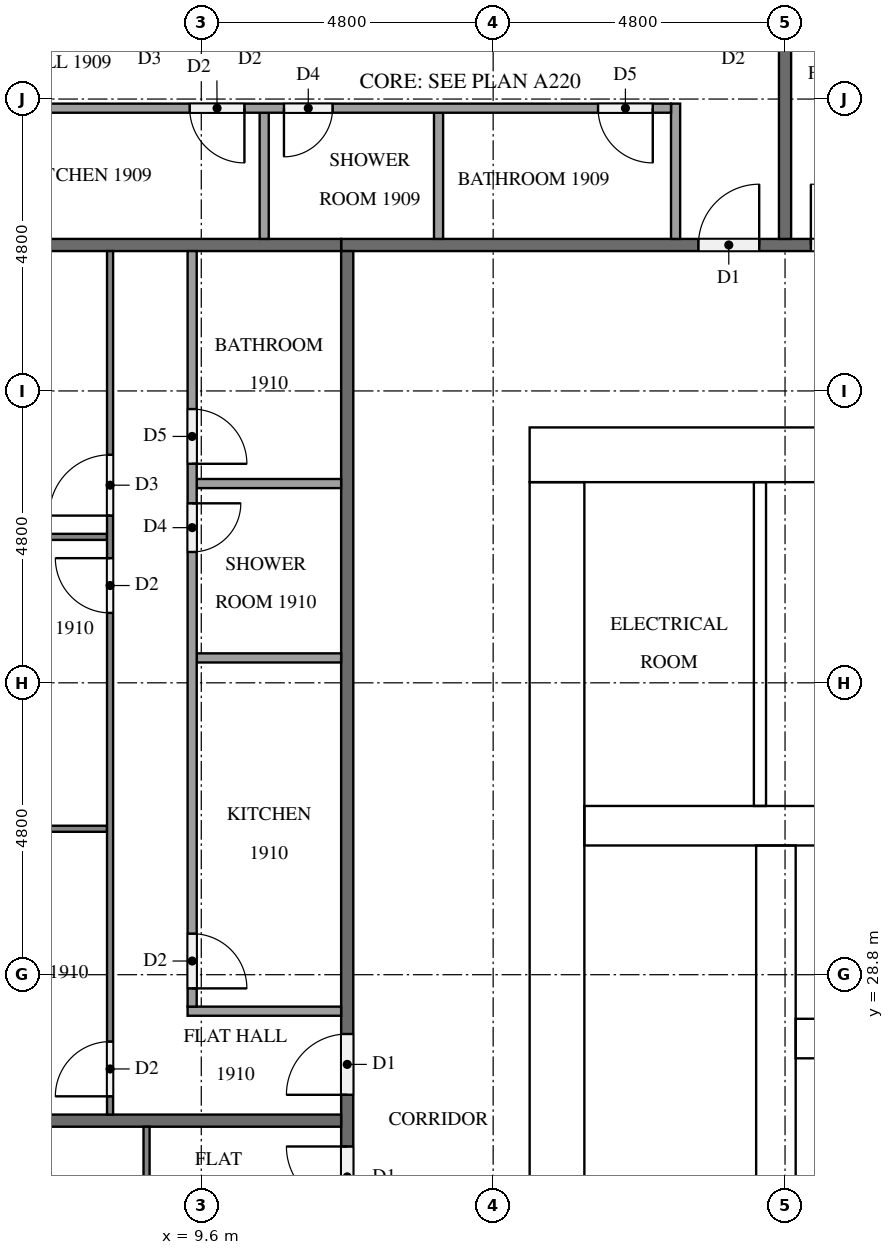
"""IFC4 building model, lengths in metres.
Left out: names, types, materials, properties, quantities, classifications, styles, units other than length and angle.
Written with IfcOpenShell. Run it as: python <this file> out.ifc"""

import sys

from ifc_helpers import new_model, si_unit, direction, frame, frame_2d, origin, place, context, subcontext, project, spatial, rectangle, extrude, element, fill, save


model = new_model("IFC4")
c1 = context("Model", 3, precision=1e-05, world=origin(), true_north=direction((0.0, 1.0)))
c2 = subcontext(c1, "Body", "Model", "MODEL_VIEW")
j1 = project(units=[si_unit("LENGTHUNIT", "METRE"), si_unit("PLANEANGLEUNIT", "RADIAN")], contexts=[c1])
p1 = place(None, origin())
s1 = spatial("IfcSite", under=j1, at=p1, CompositionType="ELEMENT")
p2 = place(p1, origin())
s2 = spatial("IfcBuilding", under=s1, at=p2, CompositionType="ELEMENT")
p3 = place(p2, frame((0.0, 0.0, 76.8)))
s3 = spatial("IfcBuildingStorey", under=s2, at=p3, CompositionType="ELEMENT", Elevation=76.8)
p4 = place(p3, frame((15.0, 37.35, 0.0), z_axis=(0.0, 0.0, 1.0), x_axis=(1.0, 0.0, 0.0)))
e1 = element("IfcWall", 1, at=p4, inside=s3, PredefinedType="SHEAR", context=c2, shape_type="SweptSolid", body=[
    extrude(rectangle(XDim=32.4, YDim=0.9, at=frame_2d((16.2, 0.0))), origin(), (0.0, 0.0, 1.0), 3.2),
])
p5 = place(p4, frame((15.3, 0.0, 0.0)))
e2 = element("IfcOpeningElement", 2, at=p5, cuts=e1, PredefinedType="OPENING", context=c2, shape_type="SweptSolid", body=[
    extrude(rectangle(XDim=1.8, YDim=2.1, at=frame_2d((0.9, 1.05))), frame((0.0, 0.46, 0.0), z_axis=(0.0, -1.0, 0.0), x_axis=(1.0, 0.0, 0.0)), (0.0, 0.0, 1.0), 0.92),
])
p6 = place(p4, frame((1.794, 0.0, 0.0)))
e3 = element("IfcOpeningElement", 3, at=p6, cuts=e1, PredefinedType="OPENING", context=c2, shape_type="SweptSolid", body=[
    extrude(rectangle(XDim=1.0, YDim=2.1, at=frame_2d((0.5, 1.05))), frame((0.0, 0.46, 0.0), z_axis=(0.0, -1.0, 0.0), x_axis=(1.0, 0.0, 0.0)), (0.0, 0.0, 1.0), 0.92),
])
p7 = place(p4, frame((5.331, 0.0, 0.0)))
e4 = element("IfcOpeningElement", 4, at=p7, cuts=e1, PredefinedType="OPENING", context=c2, shape_type="SweptSolid", body=[
    extrude(rectangle(XDim=1.0, YDim=2.1, at=frame_2d((0.5, 1.05))), frame((0.0, 0.46, 0.0), z_axis=(0.0, -1.0, 0.0), x_axis=(1.0, 0.0, 0.0)), (0.0, 0.0, 1.0), 0.92),
])
p8 = place(p3, frame((15.45, 15.9, 0.0), z_axis=(0.0, 0.0, 1.0), x_axis=(0.0, 1.0, 0.0)))
e5 = element("IfcWall", 5, at=p8, inside=s3, PredefinedType="SHEAR", context=c2, shape_type="SweptSolid", body=[
    extrude(rectangle(XDim=21.0, YDim=0.9, at=frame_2d((10.5, 0.0))), origin(), (0.0, 0.0, 1.0), 3.2),
])
p9 = place(p8, frame((4.86, 0.0, 0.0)))
e6 = element("IfcOpeningElement", 6, at=p9, cuts=e5, PredefinedType="OPENING", context=c2, shape_type="SweptSolid", body=[
    extrude(rectangle(XDim=1.2, YDim=2.1, at=frame_2d((0.6, 1.05))), frame((0.0, 0.46, 0.0), z_axis=(0.0, -1.0, 0.0), x_axis=(1.0, 0.0, 0.0)), (0.0, 0.0, 1.0), 0.92),
])
p10 = place(p3, frame((19.05, 15.9, 0.0), z_axis=(0.0, 0.0, 1.0), x_axis=(0.0, 1.0, 0.0)))
e7 = element("IfcWall", 7, at=p10, inside=s3, PredefinedType="SHEAR", context=c2, shape_type="SweptSolid", body=[
    extrude(rectangle(XDim=15.025, YDim=0.65, at=frame_2d((7.513, 0.0))), origin(), (0.0, 0.0, 1.0), 3.2),
])
p11 = place(p10, frame((9.55, 0.0, 0.0)))
e8 = element("IfcOpeningElement", 8, at=p11, cuts=e7, PredefinedType="OPENING", context=c2, shape_type="SweptSolid", body=[
    extrude(rectangle(XDim=1.1, YDim=2.1, at=frame_2d((0.55, 1.05))), frame((0.0, 0.335, 0.0), z_axis=(0.0, -1.0, 0.0), x_axis=(1.0, 0.0, 0.0)), (0.0, 0.0, 1.0), 0.67),
])
p12 = place(p10, frame((13.05, 0.0, 0.0)))
e9 = element("IfcOpeningElement", 9, at=p12, cuts=e7, PredefinedType="OPENING", context=c2, shape_type="SweptSolid", body=[
    extrude(rectangle(XDim=1.1, YDim=2.1, at=frame_2d((0.55, 1.05))), frame((0.0, 0.335, 0.0), z_axis=(0.0, -1.0, 0.0), x_axis=(1.0, 0.0, 0.0)), (0.0, 0.0, 1.0), 0.67),
])
p13 = place(p10, frame((0.3, 0.0, 0.0)))
e10 = element("IfcOpeningElement", 10, at=p13, cuts=e7, PredefinedType="OPENING", context=c2, shape_type="SweptSolid", body=[
    extrude(rectangle(XDim=1.2, YDim=2.1, at=frame_2d((0.6, 1.05))), frame((0.0, 0.335, 0.0), z_axis=(0.0, -1.0, 0.0), x_axis=(1.0, 0.0, 0.0)), (0.0, 0.0, 1.0), 0.67),
])
p14 = place(p3, frame((19.375, 27.75, 0.0), z_axis=(0.0, 0.0, 1.0), x_axis=(1.0, 0.0, 0.0)))
e11 = element("IfcWall", 11, at=p14, inside=s3, PredefinedType="SHEAR", context=c2, shape_type="SweptSolid", body=[
    extrude(rectangle(XDim=3.4, YDim=0.65, at=frame_2d((1.7, 0.0))), origin(), (0.0, 0.0, 1.0), 3.2),
])
p15 = place(p3, frame((15.9, 31.25, 0.0), z_axis=(0.0, 0.0, 1.0), x_axis=(1.0, 0.0, 0.0)))
e12 = element("IfcWall", 12, at=p15, inside=s3, PredefinedType="SHEAR", context=c2, shape_type="SweptSolid", body=[
    extrude(rectangle(XDim=6.875, YDim=0.65, at=frame_2d((3.438, 0.0))), origin(), (0.0, 0.0, 1.0), 3.2),
])
p16 = place(p3, frame((18.788, 31.575, 0.0), z_axis=(0.0, 0.0, 1.0), x_axis=(0.0, 1.0, 0.0)))
e13 = element("IfcWall", 13, at=p16, inside=s3, PredefinedType="PARTITIONING", context=c2, shape_type="SweptSolid", body=[
    extrude(rectangle(XDim=5.325, YDim=0.2, at=frame_2d((2.663, 0.0))), origin(), (0.0, 0.0, 1.0), 3.2),
])
p17 = place(p3, frame((11.9, 40.8, 0.0), z_axis=(0.0, 0.0, 1.0), x_axis=(1.0, 0.0, 0.0)))
e14 = element("IfcWall", 14, at=p17, inside=s3, PredefinedType="PARTITIONING", context=c2, shape_type="SweptSolid", body=[
    extrude(rectangle(XDim=38.6, YDim=0.2, at=frame_2d((19.3, 0.0))), origin(), (0.0, 0.0, 1.0), 3.2),
])
p18 = place(p17, frame((22.125, 0.0, 0.0)))
e15 = element("IfcOpeningElement", 15, at=p18, cuts=e14, PredefinedType="OPENING", context=c2, shape_type="SweptSolid", body=[
    extrude(rectangle(XDim=1.0, YDim=2.1, at=frame_2d((0.5, 1.05))), frame((0.0, 0.11, 0.0), z_axis=(0.0, -1.0, 0.0), x_axis=(1.0, 0.0, 0.0)), (0.0, 0.0, 1.0), 0.22),
])
p19 = place(p17, frame((7.725, 0.0, 0.0)))
e16 = element("IfcOpeningElement", 16, at=p19, cuts=e14, PredefinedType="OPENING", context=c2, shape_type="SweptSolid", body=[
    extrude(rectangle(XDim=1.0, YDim=2.1, at=frame_2d((0.5, 1.05))), frame((0.0, 0.11, 0.0), z_axis=(0.0, -1.0, 0.0), x_axis=(1.0, 0.0, 0.0)), (0.0, 0.0, 1.0), 0.22),
])
p20 = place(p17, frame((5.875, 0.0, 0.0)))
e17 = element("IfcOpeningElement", 17, at=p20, cuts=e14, PredefinedType="OPENING", context=c2, shape_type="SweptSolid", body=[
    extrude(rectangle(XDim=1.0, YDim=2.1, at=frame_2d((0.5, 1.05))), frame((0.0, 0.11, 0.0), z_axis=(0.0, -1.0, 0.0), x_axis=(1.0, 0.0, 0.0)), (0.0, 0.0, 1.0), 0.22),
])
p21 = place(p3, frame((12.0, 12.1, 0.0), z_axis=(0.0, 0.0, 1.0), x_axis=(0.0, 1.0, 0.0)))
e18 = element("IfcWall", 18, at=p21, inside=s3, PredefinedType="PARTITIONING", context=c2, shape_type="SweptSolid", body=[
    extrude(rectangle(XDim=28.6, YDim=0.2, at=frame_2d((14.3, 0.0))), origin(), (0.0, 0.0, 1.0), 3.2),
])
p22 = place(p21, frame((14.725, 0.0, 0.0)))
e19 = element("IfcOpeningElement", 19, at=p22, cuts=e18, PredefinedType="OPENING", context=c2, shape_type="SweptSolid", body=[
    extrude(rectangle(XDim=1.0, YDim=2.1, at=frame_2d((0.5, 1.05))), frame((0.0, 0.11, 0.0), z_axis=(0.0, -1.0, 0.0), x_axis=(1.0, 0.0, 0.0)), (0.0, 0.0, 1.0), 0.22),
])
p23 = place(p21, frame((12.875, 0.0, 0.0)))
e20 = element("IfcOpeningElement", 20, at=p23, cuts=e18, PredefinedType="OPENING", context=c2, shape_type="SweptSolid", body=[
    extrude(rectangle(XDim=1.0, YDim=2.1, at=frame_2d((0.5, 1.05))), frame((0.0, 0.11, 0.0), z_axis=(0.0, -1.0, 0.0), x_axis=(1.0, 0.0, 0.0)), (0.0, 0.0, 1.0), 0.22),
])
p24 = place(p21, frame((0.875, 0.0, 0.0)))
e21 = element("IfcOpeningElement", 21, at=p24, cuts=e18, PredefinedType="OPENING", context=c2, shape_type="SweptSolid", body=[
    extrude(rectangle(XDim=1.0, YDim=2.1, at=frame_2d((0.5, 1.05))), frame((0.0, 0.11, 0.0), z_axis=(0.0, -1.0, 0.0), x_axis=(1.0, 0.0, 0.0)), (0.0, 0.0, 1.0), 0.22),
])
p25 = place(p3, frame((19.2, 47.575, 0.0), z_axis=(0.0, 0.0, 1.0), x_axis=(0.0, -1.0, 0.0)))
e22 = element("IfcWall", 22, at=p25, inside=s3, PredefinedType="PARTITIONING", context=c2, shape_type="SweptSolid", body=[
    extrude(rectangle(XDim=6.675, YDim=0.2, at=frame_2d((3.337, 0.0))), origin(), (0.0, 0.0, 1.0), 3.2),
])
for number, where, z_axis, x_axis in (
    (23, (4.9, 40.8, 0.0), (0.0, 0.0, 1.0), (1.0, 0.0, 0.0)),
    (24, (4.9, 26.4, 0.0), (0.0, 0.0, 1.0), (1.0, 0.0, 0.0)),
):
    element("IfcWall", number, at=place(p3, frame(where, z_axis=z_axis, x_axis=x_axis)), inside=s3, PredefinedType="PARTITIONING", context=c2, shape_type="SweptSolid", body=[
        extrude(rectangle(XDim=7.0, YDim=0.2, at=frame_2d((3.5, 0.0))), origin(), (0.0, 0.0, 1.0), 3.2),
    ])
for number, where, z_axis, x_axis in (
    (25, (13.502, 40.9, 0.0), (0.0, 0.0, 1.0), (0.0, 1.0, 0.0)),
    (26, (10.635, 40.9, 0.0), (0.0, 0.0, 1.0), (0.0, 1.0, 0.0)),
):
    element("IfcWall", number, at=place(p3, frame(where, z_axis=z_axis, x_axis=x_axis)), inside=s3, PredefinedType="PARTITIONING", context=c2, shape_type="SweptSolid", body=[
        extrude(rectangle(XDim=2.075, YDim=0.15, at=frame_2d((1.038, 0.0))), origin(), (0.0, 0.0, 1.0), 3.2),
    ])
p26 = place(p3, frame((17.4, 40.9, 0.0), z_axis=(0.0, 0.0, 1.0), x_axis=(0.0, 1.0, 0.0)))
e27 = element("IfcWall", 27, at=p26, inside=s3, PredefinedType="PARTITIONING", context=c2, shape_type="SweptSolid", body=[
    extrude(rectangle(XDim=2.225, YDim=0.15, at=frame_2d((1.113, 0.0))), origin(), (0.0, 0.0, 1.0), 3.2),
])
p27 = place(p3, frame((17.325, 43.05, 0.0), z_axis=(0.0, 0.0, 1.0), x_axis=(-1.0, 0.0, 0.0)))
e28 = element("IfcWall", 28, at=p27, inside=s3, PredefinedType="PARTITIONING", context=c2, shape_type="SweptSolid", body=[
    extrude(rectangle(XDim=11.95, YDim=0.15, at=frame_2d((5.975, 0.0))), origin(), (0.0, 0.0, 1.0), 3.2),
])
p28 = place(p27, frame((0.3, 0.0, 0.0)))
e29 = element("IfcOpeningElement", 29, at=p28, cuts=e28, PredefinedType="OPENING", context=c2, shape_type="SweptSolid", body=[
    extrude(rectangle(XDim=0.9, YDim=2.1, at=frame_2d((0.45, 1.05))), frame((0.0, 0.085, 0.0), z_axis=(0.0, -1.0, 0.0), x_axis=(1.0, 0.0, 0.0)), (0.0, 0.0, 1.0), 0.17),
])
p29 = place(p27, frame((5.565, 0.0, 0.0)))
e30 = element("IfcOpeningElement", 30, at=p29, cuts=e28, PredefinedType="OPENING", context=c2, shape_type="SweptSolid", body=[
    extrude(rectangle(XDim=0.8, YDim=2.1, at=frame_2d((0.4, 1.05))), frame((0.0, 0.085, 0.0), z_axis=(0.0, -1.0, 0.0), x_axis=(1.0, 0.0, 0.0)), (0.0, 0.0, 1.0), 0.17),
])
p30 = place(p27, frame((7.015, 0.0, 0.0)))
e31 = element("IfcOpeningElement", 31, at=p30, cuts=e28, PredefinedType="OPENING", context=c2, shape_type="SweptSolid", body=[
    extrude(rectangle(XDim=0.9, YDim=2.1, at=frame_2d((0.45, 1.05))), frame((0.0, 0.085, 0.0), z_axis=(0.0, -1.0, 0.0), x_axis=(1.0, 0.0, 0.0)), (0.0, 0.0, 1.0), 0.17),
])
for number, where, z_axis, x_axis in (
    (32, (8.05, 31.2, 0.0), (0.0, 0.0, 1.0), (-1.0, 0.0, 0.0)),
    (33, (8.05, 36.0, 0.0), (0.0, 0.0, 1.0), (-1.0, 0.0, 0.0)),
):
    element("IfcWall", number, at=place(p3, frame(where, z_axis=z_axis, x_axis=x_axis)), inside=s3, PredefinedType="PARTITIONING", context=c2, shape_type="SweptSolid", body=[
        extrude(rectangle(XDim=3.15, YDim=0.1, at=frame_2d((1.575, 0.0))), origin(), (0.0, 0.0, 1.0), 3.2),
    ])
p31 = place(p3, frame((8.1, 26.5, 0.0), z_axis=(0.0, 0.0, 1.0), x_axis=(0.0, 1.0, 0.0)))
e34 = element("IfcWall", 34, at=p31, inside=s3, PredefinedType="PARTITIONING", context=c2, shape_type="SweptSolid", body=[
    extrude(rectangle(XDim=14.2, YDim=0.1, at=frame_2d((7.1, 0.0))), origin(), (0.0, 0.0, 1.0), 3.2),
])
p32 = place(p31, frame((0.3, 0.0, 0.0)))
e35 = element("IfcOpeningElement", 35, at=p32, cuts=e34, PredefinedType="OPENING", context=c2, shape_type="SweptSolid", body=[
    extrude(rectangle(XDim=0.9, YDim=2.1, at=frame_2d((0.45, 1.05))), frame((0.0, 0.06, 0.0), z_axis=(0.0, -1.0, 0.0), x_axis=(1.0, 0.0, 0.0)), (0.0, 0.0, 1.0), 0.12),
])
p33 = place(p31, frame((8.25, 0.0, 0.0)))
e36 = element("IfcOpeningElement", 36, at=p33, cuts=e34, PredefinedType="OPENING", context=c2, shape_type="SweptSolid", body=[
    extrude(rectangle(XDim=0.9, YDim=2.1, at=frame_2d((0.45, 1.05))), frame((0.0, 0.06, 0.0), z_axis=(0.0, -1.0, 0.0), x_axis=(1.0, 0.0, 0.0)), (0.0, 0.0, 1.0), 0.12),
])
p34 = place(p31, frame((9.85, 0.0, 0.0)))
e37 = element("IfcOpeningElement", 37, at=p34, cuts=e34, PredefinedType="OPENING", context=c2, shape_type="SweptSolid", body=[
    extrude(rectangle(XDim=1.0, YDim=2.1, at=frame_2d((0.5, 1.05))), frame((0.0, 0.06, 0.0), z_axis=(0.0, -1.0, 0.0), x_axis=(1.0, 0.0, 0.0)), (0.0, 0.0, 1.0), 0.12),
])
for number, where, z_axis, x_axis in (
    (38, (11.9, 34.01, 0.0), (0.0, 0.0, 1.0), (-1.0, 0.0, 0.0)),
    (39, (11.9, 36.877, 0.0), (0.0, 0.0, 1.0), (-1.0, 0.0, 0.0)),
):
    element("IfcWall", number, at=place(p3, frame(where, z_axis=z_axis, x_axis=x_axis)), inside=s3, PredefinedType="PARTITIONING", context=c2, shape_type="SweptSolid", body=[
        extrude(rectangle(XDim=2.375, YDim=0.15, at=frame_2d((1.188, 0.0))), origin(), (0.0, 0.0, 1.0), 3.2),
    ])
p35 = place(p3, frame((11.9, 28.2, 0.0), z_axis=(0.0, 0.0, 1.0), x_axis=(-1.0, 0.0, 0.0)))
e40 = element("IfcWall", 40, at=p35, inside=s3, PredefinedType="PARTITIONING", context=c2, shape_type="SweptSolid", body=[
    extrude(rectangle(XDim=2.525, YDim=0.15, at=frame_2d((1.262, 0.0))), origin(), (0.0, 0.0, 1.0), 3.2),
])
p36 = place(p3, frame((9.45, 40.7, 0.0), z_axis=(0.0, 0.0, 1.0), x_axis=(0.0, -1.0, 0.0)))
e41 = element("IfcWall", 41, at=p36, inside=s3, PredefinedType="PARTITIONING", context=c2, shape_type="SweptSolid", body=[
    extrude(rectangle(XDim=12.425, YDim=0.15, at=frame_2d((6.212, 0.0))), origin(), (0.0, 0.0, 1.0), 3.2),
])
p37 = place(p36, frame((11.225, 0.0, 0.0)))
e42 = element("IfcOpeningElement", 42, at=p37, cuts=e41, PredefinedType="OPENING", context=c2, shape_type="SweptSolid", body=[
    extrude(rectangle(XDim=0.9, YDim=2.1, at=frame_2d((0.45, 1.05))), frame((0.0, 0.085, 0.0), z_axis=(0.0, -1.0, 0.0), x_axis=(1.0, 0.0, 0.0)), (0.0, 0.0, 1.0), 0.17),
])
p38 = place(p36, frame((4.148, 0.0, 0.0)))
e43 = element("IfcOpeningElement", 43, at=p38, cuts=e41, PredefinedType="OPENING", context=c2, shape_type="SweptSolid", body=[
    extrude(rectangle(XDim=0.8, YDim=2.1, at=frame_2d((0.4, 1.05))), frame((0.0, 0.085, 0.0), z_axis=(0.0, -1.0, 0.0), x_axis=(1.0, 0.0, 0.0)), (0.0, 0.0, 1.0), 0.17),
])
p39 = place(p36, frame((2.598, 0.0, 0.0)))
e44 = element("IfcOpeningElement", 44, at=p39, cuts=e41, PredefinedType="OPENING", context=c2, shape_type="SweptSolid", body=[
    extrude(rectangle(XDim=0.9, YDim=2.1, at=frame_2d((0.45, 1.05))), frame((0.0, 0.085, 0.0), z_axis=(0.0, -1.0, 0.0), x_axis=(1.0, 0.0, 0.0)), (0.0, 0.0, 1.0), 0.17),
])
p40 = place(p3, frame((8.7, 14.5, 0.0), z_axis=(0.0, 0.0, 1.0), x_axis=(0.0, 1.0, 0.0)))
e45 = element("IfcWall", 45, at=p40, inside=s3, PredefinedType="PARTITIONING", context=c2, shape_type="SweptSolid", body=[
    extrude(rectangle(XDim=11.8, YDim=0.1, at=frame_2d((5.9, 0.0))), origin(), (0.0, 0.0, 1.0), 3.2),
])
p41 = place(p40, frame((5.05, 0.0, 0.0)))
e46 = element("IfcOpeningElement", 46, at=p41, cuts=e45, PredefinedType="OPENING", context=c2, shape_type="SweptSolid", body=[
    extrude(rectangle(XDim=1.0, YDim=2.1, at=frame_2d((0.5, 1.05))), frame((0.0, 0.06, 0.0), z_axis=(0.0, -1.0, 0.0), x_axis=(1.0, 0.0, 0.0)), (0.0, 0.0, 1.0), 0.12),
])
p42 = place(p40, frame((3.45, 0.0, 0.0)))
e47 = element("IfcOpeningElement", 47, at=p42, cuts=e45, PredefinedType="OPENING", context=c2, shape_type="SweptSolid", body=[
    extrude(rectangle(XDim=0.9, YDim=2.1, at=frame_2d((0.45, 1.05))), frame((0.0, 0.06, 0.0), z_axis=(0.0, -1.0, 0.0), x_axis=(1.0, 0.0, 0.0)), (0.0, 0.0, 1.0), 0.12),
])
p43 = place(p11, origin())
e48 = element("IfcDoor", 48, at=p43, inside=s3, OperationType="DOUBLE_DOOR_SLIDING", PredefinedType="DOOR", context=c2, shape_type="SweptSolid", body=[
    extrude(rectangle(XDim=1.1, YDim=2.1, at=frame_2d((0.55, 1.05))), frame((0.0, 0.025, 0.0), z_axis=(0.0, -1.0, 0.0), x_axis=(1.0, 0.0, 0.0)), (0.0, 0.0, 1.0), 0.05),
])
fill(e8, e48)
p44 = place(p12, origin())
e49 = element("IfcDoor", 49, at=p44, inside=s3, OperationType="DOUBLE_DOOR_SLIDING", PredefinedType="DOOR", context=c2, shape_type="SweptSolid", body=[
    extrude(rectangle(XDim=1.1, YDim=2.1, at=frame_2d((0.55, 1.05))), frame((0.0, 0.025, 0.0), z_axis=(0.0, -1.0, 0.0), x_axis=(1.0, 0.0, 0.0)), (0.0, 0.0, 1.0), 0.05),
])
fill(e9, e49)
p45 = place(p6, origin())
e50 = element("IfcDoor", 50, at=p45, inside=s3, OperationType="SINGLE_SWING_RIGHT", PredefinedType="DOOR", context=c2, shape_type="SweptSolid", body=[
    extrude(rectangle(XDim=1.0, YDim=2.1, at=frame_2d((0.5, 1.05))), frame((0.0, 0.025, 0.0), z_axis=(0.0, -1.0, 0.0), x_axis=(1.0, 0.0, 0.0)), (0.0, 0.0, 1.0), 0.05),
])
fill(e3, e50)
p46 = place(p19, origin())
e51 = element("IfcDoor", 51, at=p46, inside=s3, OperationType="SINGLE_SWING_LEFT", PredefinedType="DOOR", context=c2, shape_type="SweptSolid", body=[
    extrude(rectangle(XDim=1.0, YDim=2.1, at=frame_2d((0.5, 1.05))), frame((0.0, 0.025, 0.0), z_axis=(0.0, -1.0, 0.0), x_axis=(1.0, 0.0, 0.0)), (0.0, 0.0, 1.0), 0.05),
])
fill(e16, e51)
p47 = place(p20, origin())
e52 = element("IfcDoor", 52, at=p47, inside=s3, OperationType="SINGLE_SWING_RIGHT", PredefinedType="DOOR", context=c2, shape_type="SweptSolid", body=[
    extrude(rectangle(XDim=1.0, YDim=2.1, at=frame_2d((0.5, 1.05))), frame((0.0, 0.025, 0.0), z_axis=(0.0, -1.0, 0.0), x_axis=(1.0, 0.0, 0.0)), (0.0, 0.0, 1.0), 0.05),
])
fill(e17, e52)
p48 = place(p22, origin())
e53 = element("IfcDoor", 53, at=p48, inside=s3, OperationType="SINGLE_SWING_LEFT", PredefinedType="DOOR", context=c2, shape_type="SweptSolid", body=[
    extrude(rectangle(XDim=1.0, YDim=2.1, at=frame_2d((0.5, 1.05))), frame((0.0, 0.025, 0.0), z_axis=(0.0, -1.0, 0.0), x_axis=(1.0, 0.0, 0.0)), (0.0, 0.0, 1.0), 0.05),
])
fill(e19, e53)
p49 = place(p23, origin())
e54 = element("IfcDoor", 54, at=p49, inside=s3, OperationType="SINGLE_SWING_RIGHT", PredefinedType="DOOR", context=c2, shape_type="SweptSolid", body=[
    extrude(rectangle(XDim=1.0, YDim=2.1, at=frame_2d((0.5, 1.05))), frame((0.0, 0.025, 0.0), z_axis=(0.0, -1.0, 0.0), x_axis=(1.0, 0.0, 0.0)), (0.0, 0.0, 1.0), 0.05),
])
fill(e20, e54)
p50 = place(p28, origin())
e55 = element("IfcDoor", 55, at=p50, inside=s3, OperationType="SINGLE_SWING_LEFT", PredefinedType="DOOR", context=c2, shape_type="SweptSolid", body=[
    extrude(rectangle(XDim=0.9, YDim=2.1, at=frame_2d((0.45, 1.05))), frame((0.0, 0.025, 0.0), z_axis=(0.0, -1.0, 0.0), x_axis=(1.0, 0.0, 0.0)), (0.0, 0.0, 1.0), 0.05),
])
fill(e29, e55)
p51 = place(p29, origin())
e56 = element("IfcDoor", 56, at=p51, inside=s3, OperationType="SINGLE_SWING_RIGHT", PredefinedType="DOOR", context=c2, shape_type="SweptSolid", body=[
    extrude(rectangle(XDim=0.8, YDim=2.1, at=frame_2d((0.4, 1.05))), frame((0.0, 0.025, 0.0), z_axis=(0.0, -1.0, 0.0), x_axis=(1.0, 0.0, 0.0)), (0.0, 0.0, 1.0), 0.05),
])
fill(e30, e56)
p52 = place(p30, origin())
e57 = element("IfcDoor", 57, at=p52, inside=s3, OperationType="SINGLE_SWING_LEFT", PredefinedType="DOOR", context=c2, shape_type="SweptSolid", body=[
    extrude(rectangle(XDim=0.9, YDim=2.1, at=frame_2d((0.45, 1.05))), frame((0.0, 0.025, 0.0), z_axis=(0.0, -1.0, 0.0), x_axis=(1.0, 0.0, 0.0)), (0.0, 0.0, 1.0), 0.05),
])
fill(e31, e57)
p53 = place(p32, origin())
e58 = element("IfcDoor", 58, at=p53, inside=s3, OperationType="SINGLE_SWING_LEFT", PredefinedType="DOOR", context=c2, shape_type="SweptSolid", body=[
    extrude(rectangle(XDim=0.9, YDim=2.1, at=frame_2d((0.45, 1.05))), frame((0.0, 0.025, 0.0), z_axis=(0.0, -1.0, 0.0), x_axis=(1.0, 0.0, 0.0)), (0.0, 0.0, 1.0), 0.05),
])
fill(e35, e58)
p54 = place(p33, origin())
e59 = element("IfcDoor", 59, at=p54, inside=s3, OperationType="SINGLE_SWING_RIGHT", PredefinedType="DOOR", context=c2, shape_type="SweptSolid", body=[
    extrude(rectangle(XDim=0.9, YDim=2.1, at=frame_2d((0.45, 1.05))), frame((0.0, 0.025, 0.0), z_axis=(0.0, -1.0, 0.0), x_axis=(1.0, 0.0, 0.0)), (0.0, 0.0, 1.0), 0.05),
])
fill(e36, e59)
p55 = place(p34, origin())
e60 = element("IfcDoor", 60, at=p55, inside=s3, OperationType="SINGLE_SWING_LEFT", PredefinedType="DOOR", context=c2, shape_type="SweptSolid", body=[
    extrude(rectangle(XDim=1.0, YDim=2.1, at=frame_2d((0.5, 1.05))), frame((0.0, 0.025, 0.0), z_axis=(0.0, -1.0, 0.0), x_axis=(1.0, 0.0, 0.0)), (0.0, 0.0, 1.0), 0.05),
])
fill(e37, e60)
p56 = place(p37, origin())
e61 = element("IfcDoor", 61, at=p56, inside=s3, OperationType="SINGLE_SWING_RIGHT", PredefinedType="DOOR", context=c2, shape_type="SweptSolid", body=[
    extrude(rectangle(XDim=0.9, YDim=2.1, at=frame_2d((0.45, 1.05))), frame((0.0, 0.025, 0.0), z_axis=(0.0, -1.0, 0.0), x_axis=(1.0, 0.0, 0.0)), (0.0, 0.0, 1.0), 0.05),
])
fill(e42, e61)
p57 = place(p38, origin())
e62 = element("IfcDoor", 62, at=p57, inside=s3, OperationType="SINGLE_SWING_LEFT", PredefinedType="DOOR", context=c2, shape_type="SweptSolid", body=[
    extrude(rectangle(XDim=0.8, YDim=2.1, at=frame_2d((0.4, 1.05))), frame((0.0, 0.025, 0.0), z_axis=(0.0, -1.0, 0.0), x_axis=(1.0, 0.0, 0.0)), (0.0, 0.0, 1.0), 0.05),
])
fill(e43, e62)
p58 = place(p39, origin())
e63 = element("IfcDoor", 63, at=p58, inside=s3, OperationType="SINGLE_SWING_RIGHT", PredefinedType="DOOR", context=c2, shape_type="SweptSolid", body=[
    extrude(rectangle(XDim=0.9, YDim=2.1, at=frame_2d((0.45, 1.05))), frame((0.0, 0.025, 0.0), z_axis=(0.0, -1.0, 0.0), x_axis=(1.0, 0.0, 0.0)), (0.0, 0.0, 1.0), 0.05),
])
fill(e44, e63)
save(model, sys.argv[1])
